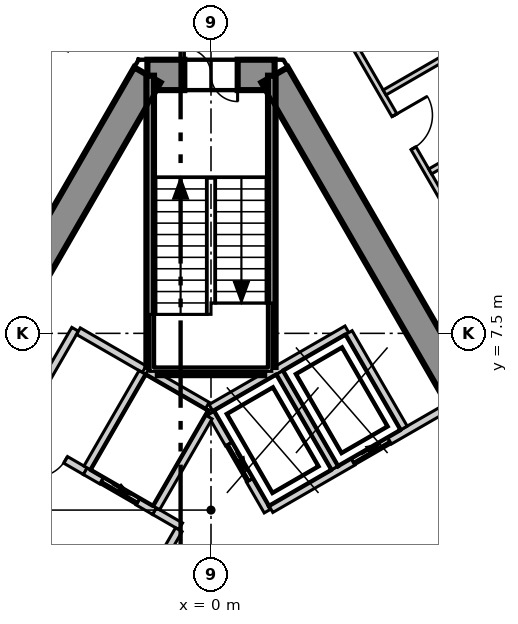
"""IFC4 building model, lengths in metres.
Left out: names, types, materials, properties, quantities, classifications, styles, units other than length and angle.
Written with IfcOpenShell. Run it as: python <this file> out.ifc"""

import sys

from ifc_helpers import new_model, si_unit, direction, frame, frame_2d, origin, place, context, subcontext, project, spatial, polyline, rectangle, outline, extrude, element, fill, save


model = new_model("IFC4")
c1 = context("Model", 3, precision=1e-05, world=origin(), true_north=direction((0.0, 1.0)))
c2 = subcontext(c1, "Body", "Model", "MODEL_VIEW")
j1 = project(units=[si_unit("LENGTHUNIT", "METRE"), si_unit("PLANEANGLEUNIT", "RADIAN")], contexts=[c1])
p1 = place(None, origin())
s1 = spatial("IfcSite", under=j1, at=p1, CompositionType="ELEMENT")
p2 = place(p1, origin())
s2 = spatial("IfcBuilding", under=s1, at=p2, CompositionType="ELEMENT")
p3 = place(p2, frame((0.0, 0.0, 116.3)))
s3 = spatial("IfcBuildingStorey", under=s2, at=p3, CompositionType="ELEMENT", Elevation=116.3)
p4 = place(p3, frame((1.674, 14.3, -0.3), z_axis=(0.0, 0.0, 1.0), x_axis=(-1.0, 0.0, 0.0)))
e1 = element("IfcWall", 1, at=p4, inside=s3, PredefinedType="SHEAR", context=c2, shape_type="SweptSolid", body=[
    extrude(outline(polyline([(-0.231, -0.4), (1.674, -0.4), (3.579, -0.4), (3.117, 0.4), (1.674, 0.4), (0.231, 0.4), (-0.231, -0.4)])), origin(), (0.0, 0.0, 1.0), 4.0),
])
p5 = place(p4, frame((0.974, 0.0, 0.3)))
e2 = element("IfcOpeningElement", 2, at=p5, cuts=e1, PredefinedType="OPENING", context=c2, shape_type="SweptSolid", body=[
    extrude(rectangle(XDim=1.4, YDim=2.1, at=frame_2d((0.7, 1.05))), frame((0.0, 0.41, 0.0), z_axis=(0.0, -1.0, 0.0), x_axis=(1.0, 0.0, 0.0)), (0.0, 0.0, 1.0), 0.82),
])
p6 = place(p3, frame((-1.674, 14.3, -0.3), z_axis=(0.0, 0.0, 1.0), x_axis=(-0.499995765644, -0.866027848477, 0.0)))
e3 = element("IfcWall", 3, at=p6, inside=s3, PredefinedType="SHEAR", context=c2, shape_type="SweptSolid", body=[
    extrude(outline(polyline([(-0.231, -0.4), (1.732, -0.4), (3.695, -0.4), (5.658, -0.4), (7.621, -0.4), (9.584, -0.4), (11.547, -0.4), (13.51, -0.4), (15.473, -0.4), (17.436, -0.4), (19.399, -0.4), (21.362, -0.4), (23.325, -0.4), (22.863, 0.4), (20.977, 0.4), (19.091, 0.4), (17.205, 0.4), (15.319, 0.4), (13.433, 0.4), (11.547, 0.4), (9.661, 0.4), (7.775, 0.4), (5.889, 0.4), (4.003, 0.4), (2.117, 0.4), (0.231, 0.4), (-0.231, -0.4)])), origin(), (0.0, 0.0, 1.0), 4.0),
])
p7 = place(p6, frame((10.997, 0.0, 0.3)))
e4 = element("IfcOpeningElement", 4, at=p7, cuts=e3, PredefinedType="OPENING", context=c2, shape_type="SweptSolid", body=[
    extrude(rectangle(XDim=1.1, YDim=2.1, at=frame_2d((0.55, 1.05))), frame((0.0, 0.41, 0.0), z_axis=(0.0, -1.0, 0.0), x_axis=(1.0, 0.0, 0.0)), (0.0, 0.0, 1.0), 0.82),
])
p8 = place(p3, frame((13.221, -5.7, -0.3), z_axis=(0.0, 0.0, 1.0), x_axis=(-0.499995765644, 0.866027848477, 0.0)))
e5 = element("IfcWall", 5, at=p8, inside=s3, PredefinedType="SHEAR", context=c2, shape_type="SweptSolid", body=[
    extrude(outline(polyline([(-0.231, -0.4), (1.732, -0.4), (3.695, -0.4), (5.658, -0.4), (7.621, -0.4), (9.584, -0.4), (11.547, -0.4), (13.51, -0.4), (15.473, -0.4), (17.436, -0.4), (19.399, -0.4), (21.362, -0.4), (23.325, -0.4), (22.863, 0.4), (20.977, 0.4), (19.091, 0.4), (17.205, 0.4), (15.319, 0.4), (13.433, 0.4), (11.547, 0.4), (9.661, 0.4), (7.775, 0.4), (5.889, 0.4), (4.003, 0.4), (2.117, 0.4), (0.231, 0.4), (-0.231, -0.4)])), origin(), (0.0, 0.0, 1.0), 4.0),
])
p9 = place(p8, frame((10.647, 0.0, 0.3)))
e6 = element("IfcOpeningElement", 6, at=p9, cuts=e5, PredefinedType="OPENING", context=c2, shape_type="SweptSolid", body=[
    extrude(rectangle(XDim=1.8, YDim=2.1, at=frame_2d((0.9, 1.05))), frame((0.0, 0.41, 0.0), z_axis=(0.0, -1.0, 0.0), x_axis=(1.0, 0.0, 0.0)), (0.0, 0.0, 1.0), 0.82),
])
p10 = place(p3, frame((-3.154, 35.185, 0.0), z_axis=(0.0, 0.0, 1.0), x_axis=(-0.499996704161, -0.866027306629, 0.0)))
e7 = element("IfcWall", 7, at=p10, inside=s3, PredefinedType="ELEMENTEDWALL", context=c2, shape_type="SweptSolid", body=[
    extrude(rectangle(XDim=57.769, YDim=0.2, at=frame_2d((28.884, 0.0))), origin(), (0.0, 0.0, 1.0), 3.7),
])
p11 = place(p10, frame((2.301, 0.0, 0.9)))
e8 = element("IfcOpeningElement", 8, at=p11, cuts=e7, PredefinedType="OPENING", context=c2, shape_type="SweptSolid", body=[
    extrude(rectangle(XDim=4.9, YDim=2.5, at=frame_2d((2.45, 1.25))), frame((0.0, 0.11, 0.0), z_axis=(0.0, -1.0, 0.0), x_axis=(1.0, 0.0, 0.0)), (0.0, 0.0, 1.0), 0.22),
])
p12 = place(p10, frame((9.199, 0.0, 0.9)))
e9 = element("IfcOpeningElement", 9, at=p12, cuts=e7, PredefinedType="OPENING", context=c2, shape_type="SweptSolid", body=[
    extrude(rectangle(XDim=4.9, YDim=2.5, at=frame_2d((2.45, 1.25))), frame((0.0, 0.11, 0.0), z_axis=(0.0, -1.0, 0.0), x_axis=(1.0, 0.0, 0.0)), (0.0, 0.0, 1.0), 0.22),
])
p13 = place(p10, frame((16.097, 0.0, 0.9)))
e10 = element("IfcOpeningElement", 10, at=p13, cuts=e7, PredefinedType="OPENING", context=c2, shape_type="SweptSolid", body=[
    extrude(rectangle(XDim=4.9, YDim=2.5, at=frame_2d((2.45, 1.25))), frame((0.0, 0.11, 0.0), z_axis=(0.0, -1.0, 0.0), x_axis=(1.0, 0.0, 0.0)), (0.0, 0.0, 1.0), 0.22),
])
p14 = place(p10, frame((22.995, 0.0, 0.9)))
e11 = element("IfcOpeningElement", 11, at=p14, cuts=e7, PredefinedType="OPENING", context=c2, shape_type="SweptSolid", body=[
    extrude(rectangle(XDim=4.9, YDim=2.5, at=frame_2d((2.45, 1.25))), frame((0.0, 0.11, 0.0), z_axis=(0.0, -1.0, 0.0), x_axis=(1.0, 0.0, 0.0)), (0.0, 0.0, 1.0), 0.22),
])
p15 = place(p10, frame((29.893, 0.0, 0.9)))
e12 = element("IfcOpeningElement", 12, at=p15, cuts=e7, PredefinedType="OPENING", context=c2, shape_type="SweptSolid", body=[
    extrude(rectangle(XDim=4.9, YDim=2.5, at=frame_2d((2.45, 1.25))), frame((0.0, 0.11, 0.0), z_axis=(0.0, -1.0, 0.0), x_axis=(1.0, 0.0, 0.0)), (0.0, 0.0, 1.0), 0.22),
])
p16 = place(p10, frame((36.791, 0.0, 0.9)))
e13 = element("IfcOpeningElement", 13, at=p16, cuts=e7, PredefinedType="OPENING", context=c2, shape_type="SweptSolid", body=[
    extrude(rectangle(XDim=4.9, YDim=2.5, at=frame_2d((2.45, 1.25))), frame((0.0, 0.11, 0.0), z_axis=(0.0, -1.0, 0.0), x_axis=(1.0, 0.0, 0.0)), (0.0, 0.0, 1.0), 0.22),
])
p17 = place(p10, frame((43.689, 0.0, 0.9)))
e14 = element("IfcOpeningElement", 14, at=p17, cuts=e7, PredefinedType="OPENING", context=c2, shape_type="SweptSolid", body=[
    extrude(rectangle(XDim=4.9, YDim=2.5, at=frame_2d((2.45, 1.25))), frame((0.0, 0.11, 0.0), z_axis=(0.0, -1.0, 0.0), x_axis=(1.0, 0.0, 0.0)), (0.0, 0.0, 1.0), 0.22),
])
p18 = place(p10, frame((50.586, 0.0, 0.9)))
e15 = element("IfcOpeningElement", 15, at=p18, cuts=e7, PredefinedType="OPENING", context=c2, shape_type="SweptSolid", body=[
    extrude(rectangle(XDim=4.9, YDim=2.5, at=frame_2d((2.45, 1.25))), frame((0.0, 0.11, 0.0), z_axis=(0.0, -1.0, 0.0), x_axis=(1.0, 0.0, 0.0)), (0.0, 0.0, 1.0), 0.22),
])
p19 = place(p3, frame((32.048, -14.861, 0.0), z_axis=(0.0, 0.0, 1.0), x_axis=(-0.499996704161, 0.866027306629, 0.0)))
e16 = element("IfcWall", 16, at=p19, inside=s3, PredefinedType="ELEMENTEDWALL", context=c2, shape_type="SweptSolid", body=[
    extrude(rectangle(XDim=57.769, YDim=0.2, at=frame_2d((28.884, 0.0))), origin(), (0.0, 0.0, 1.0), 3.7),
])
p20 = place(p19, frame((2.302, 0.0, 0.9)))
e17 = element("IfcOpeningElement", 17, at=p20, cuts=e16, PredefinedType="OPENING", context=c2, shape_type="SweptSolid", body=[
    extrude(rectangle(XDim=4.9, YDim=2.5, at=frame_2d((2.45, 1.25))), frame((0.0, 0.11, 0.0), z_axis=(0.0, -1.0, 0.0), x_axis=(1.0, 0.0, 0.0)), (0.0, 0.0, 1.0), 0.22),
])
p21 = place(p19, frame((9.199, 0.0, 0.9)))
e18 = element("IfcOpeningElement", 18, at=p21, cuts=e16, PredefinedType="OPENING", context=c2, shape_type="SweptSolid", body=[
    extrude(rectangle(XDim=4.9, YDim=2.5, at=frame_2d((2.45, 1.25))), frame((0.0, 0.11, 0.0), z_axis=(0.0, -1.0, 0.0), x_axis=(1.0, 0.0, 0.0)), (0.0, 0.0, 1.0), 0.22),
])
p22 = place(p19, frame((16.097, 0.0, 0.9)))
e19 = element("IfcOpeningElement", 19, at=p22, cuts=e16, PredefinedType="OPENING", context=c2, shape_type="SweptSolid", body=[
    extrude(rectangle(XDim=4.9, YDim=2.5, at=frame_2d((2.45, 1.25))), frame((0.0, 0.11, 0.0), z_axis=(0.0, -1.0, 0.0), x_axis=(1.0, 0.0, 0.0)), (0.0, 0.0, 1.0), 0.22),
])
p23 = place(p19, frame((22.995, 0.0, 0.9)))
e20 = element("IfcOpeningElement", 20, at=p23, cuts=e16, PredefinedType="OPENING", context=c2, shape_type="SweptSolid", body=[
    extrude(rectangle(XDim=4.9, YDim=2.5, at=frame_2d((2.45, 1.25))), frame((0.0, 0.11, 0.0), z_axis=(0.0, -1.0, 0.0), x_axis=(1.0, 0.0, 0.0)), (0.0, 0.0, 1.0), 0.22),
])
p24 = place(p19, frame((29.893, 0.0, 0.9)))
e21 = element("IfcOpeningElement", 21, at=p24, cuts=e16, PredefinedType="OPENING", context=c2, shape_type="SweptSolid", body=[
    extrude(rectangle(XDim=4.9, YDim=2.5, at=frame_2d((2.45, 1.25))), frame((0.0, 0.11, 0.0), z_axis=(0.0, -1.0, 0.0), x_axis=(1.0, 0.0, 0.0)), (0.0, 0.0, 1.0), 0.22),
])
p25 = place(p19, frame((36.791, 0.0, 0.9)))
e22 = element("IfcOpeningElement", 22, at=p25, cuts=e16, PredefinedType="OPENING", context=c2, shape_type="SweptSolid", body=[
    extrude(rectangle(XDim=4.9, YDim=2.5, at=frame_2d((2.45, 1.25))), frame((0.0, 0.11, 0.0), z_axis=(0.0, -1.0, 0.0), x_axis=(1.0, 0.0, 0.0)), (0.0, 0.0, 1.0), 0.22),
])
p26 = place(p19, frame((43.689, 0.0, 0.9)))
e23 = element("IfcOpeningElement", 23, at=p26, cuts=e16, PredefinedType="OPENING", context=c2, shape_type="SweptSolid", body=[
    extrude(rectangle(XDim=4.9, YDim=2.5, at=frame_2d((2.45, 1.25))), frame((0.0, 0.11, 0.0), z_axis=(0.0, -1.0, 0.0), x_axis=(1.0, 0.0, 0.0)), (0.0, 0.0, 1.0), 0.22),
])
p27 = place(p19, frame((50.587, 0.0, 0.9)))
e24 = element("IfcOpeningElement", 24, at=p27, cuts=e16, PredefinedType="OPENING", context=c2, shape_type="SweptSolid", body=[
    extrude(rectangle(XDim=4.9, YDim=2.5, at=frame_2d((2.45, 1.25))), frame((0.0, 0.11, 0.0), z_axis=(0.0, -1.0, 0.0), x_axis=(1.0, 0.0, 0.0)), (0.0, 0.0, 1.0), 0.22),
])
p28 = place(p3, frame((-5.454, 12.154, 0.0), z_axis=(0.0, 0.0, 1.0), x_axis=(0.500029221456, 0.866008532111, 0.0)))
e25 = element("IfcWall", 25, at=p28, inside=s3, PredefinedType="PARTITIONING", context=c2, shape_type="SweptSolid", body=[
    extrude(rectangle(XDim=10.907, YDim=0.15, at=frame_2d((5.454, 0.0))), origin(), (0.0, 0.0, 1.0), 3.7),
])
p29 = place(p28, frame((7.857, 0.0, 0.0)))
e26 = element("IfcOpeningElement", 26, at=p29, cuts=e25, PredefinedType="OPENING", context=c2, shape_type="SweptSolid", body=[
    extrude(rectangle(XDim=1.1, YDim=2.1, at=frame_2d((0.55, 1.05))), frame((0.0, 0.085, 0.0), z_axis=(0.0, -1.0, 0.0), x_axis=(1.0, 0.0, 0.0)), (0.0, 0.0, 1.0), 0.17),
])
p30 = place(p28, frame((2.248, 0.0, 0.0)))
e27 = element("IfcOpeningElement", 27, at=p30, cuts=e25, PredefinedType="OPENING", context=c2, shape_type="SweptSolid", body=[
    extrude(rectangle(XDim=1.0, YDim=2.1, at=frame_2d((0.5, 1.05))), frame((0.0, 0.085, 0.0), z_axis=(0.0, -1.0, 0.0), x_axis=(1.0, 0.0, 0.0)), (0.0, 0.0, 1.0), 0.17),
])
p31 = place(p28, frame((4.348, 0.0, 0.0)))
e28 = element("IfcOpeningElement", 28, at=p31, cuts=e25, PredefinedType="OPENING", context=c2, shape_type="SweptSolid", body=[
    extrude(rectangle(XDim=0.9, YDim=2.1, at=frame_2d((0.45, 1.05))), frame((0.0, 0.085, 0.0), z_axis=(0.0, -1.0, 0.0), x_axis=(1.0, 0.0, 0.0)), (0.0, 0.0, 1.0), 0.17),
])
p32 = place(p3, frame((0.076, 21.468, 0.0), z_axis=(0.0, 0.0, 1.0), x_axis=(0.500006592492, -0.866021597574, 0.0)))
e29 = element("IfcWall", 29, at=p32, inside=s3, PredefinedType="PARTITIONING", context=c2, shape_type="SweptSolid", body=[
    extrude(rectangle(XDim=17.652, YDim=0.15, at=frame_2d((8.826, 0.0))), origin(), (0.0, 0.0, 1.0), 3.7),
])
p33 = place(p32, frame((6.303, 0.0, 0.0)))
e30 = element("IfcOpeningElement", 30, at=p33, cuts=e29, PredefinedType="OPENING", context=c2, shape_type="SweptSolid", body=[
    extrude(rectangle(XDim=1.1, YDim=2.1, at=frame_2d((0.55, 1.05))), frame((0.0, 0.085, 0.0), z_axis=(0.0, -1.0, 0.0), x_axis=(1.0, 0.0, 0.0)), (0.0, 0.0, 1.0), 0.17),
])
p34 = place(p32, frame((12.403, 0.0, 0.0)))
e31 = element("IfcOpeningElement", 31, at=p34, cuts=e29, PredefinedType="OPENING", context=c2, shape_type="SweptSolid", body=[
    extrude(rectangle(XDim=0.9, YDim=2.1, at=frame_2d((0.45, 1.05))), frame((0.0, 0.085, 0.0), z_axis=(0.0, -1.0, 0.0), x_axis=(1.0, 0.0, 0.0)), (0.0, 0.0, 1.0), 0.17),
])
p35 = place(p32, frame((9.503, 0.0, 0.0)))
e32 = element("IfcOpeningElement", 32, at=p35, cuts=e29, PredefinedType="OPENING", context=c2, shape_type="SweptSolid", body=[
    extrude(rectangle(XDim=1.0, YDim=2.1, at=frame_2d((0.5, 1.05))), frame((0.0, 0.085, 0.0), z_axis=(0.0, -1.0, 0.0), x_axis=(1.0, 0.0, 0.0)), (0.0, 0.0, 1.0), 0.17),
])
p36 = place(p32, frame((1.708, 0.0, 0.0)))
e33 = element("IfcOpeningElement", 33, at=p36, cuts=e29, PredefinedType="OPENING", context=c2, shape_type="SweptSolid", body=[
    extrude(rectangle(XDim=1.1, YDim=2.1, at=frame_2d((0.55, 1.05))), frame((0.0, 0.085, 0.0), z_axis=(0.0, -1.0, 0.0), x_axis=(1.0, 0.0, 0.0)), (0.0, 0.0, 1.0), 0.17),
])
p37 = place(p3, frame((4.568, 13.838, 0.0), z_axis=(0.0, 0.0, 1.0), x_axis=(0.866013532718, 0.500020560727, 0.0)))
e34 = element("IfcWall", 34, at=p37, inside=s3, PredefinedType="PARTITIONING", context=c2, shape_type="SweptSolid", body=[
    extrude(rectangle(XDim=3.45, YDim=0.15, at=frame_2d((1.725, 0.0))), origin(), (0.0, 0.0, 1.0), 3.7),
])
p38 = place(p3, frame((5.768, 11.76, 0.0), z_axis=(0.0, 0.0, 1.0), x_axis=(0.866031223622, 0.49998991961, 0.0)))
e35 = element("IfcWall", 35, at=p38, inside=s3, PredefinedType="PARTITIONING", context=c2, shape_type="SweptSolid", body=[
    extrude(rectangle(XDim=3.45, YDim=0.15, at=frame_2d((1.725, 0.0))), origin(), (0.0, 0.0, 1.0), 3.7),
])
p39 = place(p3, frame((-0.002, 5.541, 0.0), z_axis=(0.0, 0.0, 1.0), x_axis=(0.86600155993, 0.500041296494, 0.0)))
e36 = element("IfcWall", 36, at=p39, inside=s3, PredefinedType="SOLIDWALL", context=c2, shape_type="SweptSolid", body=[
    extrude(rectangle(XDim=4.132, YDim=0.2, at=frame_2d((2.066, 0.0))), origin(), (0.0, 0.0, 1.0), 3.7),
])
p40 = place(p3, frame((0.0, 5.4, 0.0), z_axis=(0.0, 0.0, 1.0), x_axis=(0.500103862429, -0.865965430478, 0.0)))
e37 = element("IfcWall", 37, at=p40, inside=s3, PredefinedType="SOLIDWALL", context=c2, shape_type="SweptSolid", body=[
    extrude(rectangle(XDim=2.973, YDim=0.2, at=frame_2d((1.487, 0.0))), origin(), (0.0, 0.0, 1.0), 3.7),
])
p41 = place(p40, frame((0.937, 0.0, 0.0)))
e38 = element("IfcOpeningElement", 38, at=p41, cuts=e37, PredefinedType="OPENING", context=c2, shape_type="SweptSolid", body=[
    extrude(rectangle(XDim=1.1, YDim=2.1, at=frame_2d((0.55, 1.05))), frame((0.0, 0.11, 0.0), z_axis=(0.0, -1.0, 0.0), x_axis=(1.0, 0.0, 0.0)), (0.0, 0.0, 1.0), 0.22),
])
p42 = place(p3, frame((1.577, 2.874, 0.0), z_axis=(0.0, 0.0, 1.0), x_axis=(0.866073694534, 0.499916348638, 0.0)))
e39 = element("IfcWall", 39, at=p42, inside=s3, PredefinedType="SOLIDWALL", context=c2, shape_type="SweptSolid", body=[
    extrude(rectangle(XDim=5.777, YDim=0.2, at=frame_2d((2.888, 0.0))), origin(), (0.0, 0.0, 1.0), 3.7),
])
p43 = place(p42, frame((2.497, 0.0, 0.0)))
e40 = element("IfcOpeningElement", 40, at=p43, cuts=e39, PredefinedType="OPENING", context=c2, shape_type="SweptSolid", body=[
    extrude(rectangle(XDim=1.1, YDim=2.1, at=frame_2d((0.55, 1.05))), frame((0.0, 0.11, 0.0), z_axis=(0.0, -1.0, 0.0), x_axis=(1.0, 0.0, 0.0)), (0.0, 0.0, 1.0), 0.22),
])
p44 = place(p3, frame((3.278, -0.071, 0.0), z_axis=(0.0, 0.0, 1.0), x_axis=(0.865929348003, 0.5001663366, 0.0)))
e41 = element("IfcWall", 41, at=p44, inside=s3, PredefinedType="SOLIDWALL", context=c2, shape_type="SweptSolid", body=[
    extrude(rectangle(XDim=5.776, YDim=0.2, at=frame_2d((2.888, 0.0))), origin(), (0.0, 0.0, 1.0), 3.7),
])
for number, where, z_axis, x_axis in (
    (42, (3.626, 7.52, 0.0), (0.0, 0.0, 1.0), (0.5, -0.866, 0.0)),
    (43, (1.807, 6.47, 0.0), (0.0, 0.0, 1.0), (0.5, -0.866, 0.0)),
):
    element("IfcWall", number, at=place(p3, frame(where, z_axis=z_axis, x_axis=x_axis)), inside=s3, PredefinedType="SOLIDWALL", context=c2, shape_type="SweptSolid", body=[
        extrude(rectangle(XDim=2.9, YDim=0.2, at=frame_2d((1.45, 0.0))), origin(), (0.0, 0.0, 1.0), 3.7),
    ])
p45 = place(p3, frame((-6.58, 5.762, 0.0), z_axis=(0.0, 0.0, 1.0), x_axis=(0.866029704776, -0.49999255039, 0.0)))
e44 = element("IfcWall", 44, at=p45, inside=s3, PredefinedType="SOLIDWALL", context=c2, shape_type="SweptSolid", body=[
    extrude(rectangle(XDim=3.782, YDim=0.2, at=frame_2d((1.891, 0.0))), origin(), (0.0, 0.0, 1.0), 3.7),
])
p46 = place(p45, frame((2.279, 0.0, 0.0)))
e45 = element("IfcOpeningElement", 45, at=p46, cuts=e44, PredefinedType="OPENING", context=c2, shape_type="SweptSolid", body=[
    extrude(rectangle(XDim=0.9, YDim=2.1, at=frame_2d((0.45, 1.05))), frame((0.0, 0.11, 0.0), z_axis=(0.0, -1.0, 0.0), x_axis=(1.0, 0.0, 0.0)), (0.0, 0.0, 1.0), 0.22),
])
p47 = place(p3, frame((-1.488, 2.822, 0.0), z_axis=(0.0, 0.0, 1.0), x_axis=(0.866236612152, -0.499633997809, 0.0)))
e46 = element("IfcWall", 46, at=p47, inside=s3, PredefinedType="SOLIDWALL", context=c2, shape_type="SweptSolid", body=[
    extrude(rectangle(XDim=0.796, YDim=0.2, at=frame_2d((0.398, 0.0))), origin(), (0.0, 0.0, 1.0), 3.7),
])
p48 = place(p3, frame((-5.076, 5.009, 0.0), z_axis=(0.0, 0.0, 1.0), x_axis=(0.50002537861, 0.866010750942, 0.0)))
e47 = element("IfcWall", 47, at=p48, inside=s3, PredefinedType="SOLIDWALL", context=c2, shape_type="SweptSolid", body=[
    extrude(rectangle(XDim=3.0, YDim=0.2, at=frame_2d((1.5, 0.0))), origin(), (0.0, 0.0, 1.0), 3.7),
])
p49 = place(p3, frame((-3.489, 7.557, 0.0), z_axis=(0.0, 0.0, 1.0), x_axis=(0.866010750942, -0.50002537861, 0.0)))
e48 = element("IfcWall", 48, at=p49, inside=s3, PredefinedType="SOLIDWALL", context=c2, shape_type="SweptSolid", body=[
    extrude(rectangle(XDim=2.0, YDim=0.2, at=frame_2d((1.0, 0.0))), origin(), (0.0, 0.0, 1.0), 3.7),
])
p50 = place(p3, frame((-2.444, -0.433, 0.0), z_axis=(0.0, 0.0, 1.0), x_axis=(0.500035624827, 0.866004834804, 0.0)))
e49 = element("IfcWall", 49, at=p50, inside=s3, PredefinedType="SOLIDWALL", context=c2, shape_type="SweptSolid", body=[
    extrude(rectangle(XDim=3.194, YDim=0.2, at=frame_2d((1.597, 0.0))), origin(), (0.0, 0.0, 1.0), 3.7),
])
p51 = place(p3, frame((-3.309, 3.873, 0.0), z_axis=(0.0, 0.0, 1.0), x_axis=(0.866098583652, -0.499873227325, 0.0)))
e50 = element("IfcWall", 50, at=p51, inside=s3, PredefinedType="SOLIDWALL", context=c2, shape_type="SweptSolid", body=[
    extrude(rectangle(XDim=2.103, YDim=0.2, at=frame_2d((1.051, 0.0))), origin(), (0.0, 0.0, 1.0), 3.7),
])
p52 = place(p51, frame((0.502, 0.0, 0.0)))
e51 = element("IfcOpeningElement", 51, at=p52, cuts=e50, PredefinedType="OPENING", context=c2, shape_type="SweptSolid", body=[
    extrude(rectangle(XDim=1.1, YDim=2.1, at=frame_2d((0.55, 1.05))), frame((0.0, 0.11, 0.0), z_axis=(0.0, -1.0, 0.0), x_axis=(1.0, 0.0, 0.0)), (0.0, 0.0, 1.0), 0.22),
])
p53 = place(p3, frame((-3.257, 3.959, 0.0), z_axis=(0.0, 0.0, 1.0), x_axis=(0.50012328804, 0.865954211699, 0.0)))
e52 = element("IfcWall", 52, at=p53, inside=s3, PredefinedType="SOLIDWALL", context=c2, shape_type="SweptSolid", body=[
    extrude(rectangle(XDim=2.9, YDim=0.2, at=frame_2d((1.45, 0.0))), origin(), (0.0, 0.0, 1.0), 3.7),
])
p54 = place(p3, frame((-1.67, 6.507, 0.0), z_axis=(0.0, 0.0, 1.0), x_axis=(0.865941441609, -0.500145398563, 0.0)))
e53 = element("IfcWall", 53, at=p54, inside=s3, PredefinedType="SOLIDWALL", context=c2, shape_type="SweptSolid", body=[
    extrude(rectangle(XDim=1.815, YDim=0.2, at=frame_2d((0.908, 0.0))), origin(), (0.0, 0.0, 1.0), 3.7),
])
p55 = place(p3, frame((-1.438, 2.909, 0.0), z_axis=(0.0, 0.0, 1.0), x_axis=(0.499829630636, 0.866123744241, 0.0)))
e54 = element("IfcWall", 54, at=p55, inside=s3, PredefinedType="SOLIDWALL", context=c2, shape_type="SweptSolid", body=[
    extrude(rectangle(XDim=2.761, YDim=0.2, at=frame_2d((1.38, 0.0))), origin(), (0.0, 0.0, 1.0), 3.7),
])
p56 = place(p3, frame((1.6, 6.615, 0.0), z_axis=(0.0, 0.0, 1.0), x_axis=(0.0, 1.0, 0.0)))
e55 = element("IfcWall", 55, at=p56, inside=s3, PredefinedType="SOLIDWALL", context=c2, shape_type="SweptSolid", body=[
    extrude(rectangle(XDim=7.665, YDim=0.2, at=frame_2d((3.833, 0.0))), origin(), (0.0, 0.0, 1.0), 3.7),
])
p57 = place(p3, frame((-1.4, 6.5, 0.0), z_axis=(0.0, 0.0, 1.0), x_axis=(1.0, 0.0, 0.0)))
e56 = element("IfcWall", 56, at=p57, inside=s3, PredefinedType="SOLIDWALL", context=c2, shape_type="SweptSolid", body=[
    extrude(rectangle(XDim=2.8, YDim=0.2, at=frame_2d((1.4, 0.0))), origin(), (0.0, 0.0, 1.0), 3.7),
])
p58 = place(p3, frame((-1.6, 6.615, 0.0), z_axis=(0.0, 0.0, 1.0), x_axis=(0.0, 1.0, 0.0)))
e57 = element("IfcWall", 57, at=p58, inside=s3, PredefinedType="SOLIDWALL", context=c2, shape_type="SweptSolid", body=[
    extrude(rectangle(XDim=7.665, YDim=0.2, at=frame_2d((3.833, 0.0))), origin(), (0.0, 0.0, 1.0), 3.7),
])
p59 = place(p41, origin())
e58 = element("IfcDoor", 58, at=p59, inside=s3, OperationType="SLIDING_TO_LEFT", PredefinedType="DOOR", context=c2, shape_type="SweptSolid", body=[
    extrude(rectangle(XDim=1.1, YDim=2.1, at=frame_2d((0.55, 1.05))), frame((0.0, 0.025, 0.0), z_axis=(0.0, -1.0, 0.0), x_axis=(1.0, 0.0, 0.0)), (0.0, 0.0, 1.0), 0.05),
])
fill(e38, e58)
p60 = place(p43, origin())
e59 = element("IfcDoor", 59, at=p60, inside=s3, OperationType="SLIDING_TO_LEFT", PredefinedType="DOOR", context=c2, shape_type="SweptSolid", body=[
    extrude(rectangle(XDim=1.1, YDim=2.1, at=frame_2d((0.55, 1.05))), frame((0.0, 0.025, 0.0), z_axis=(0.0, -1.0, 0.0), x_axis=(1.0, 0.0, 0.0)), (0.0, 0.0, 1.0), 0.05),
])
fill(e40, e59)
p61 = place(p52, origin())
e60 = element("IfcDoor", 60, at=p61, inside=s3, OperationType="SLIDING_TO_LEFT", PredefinedType="DOOR", context=c2, shape_type="SweptSolid", body=[
    extrude(rectangle(XDim=1.1, YDim=2.1, at=frame_2d((0.55, 1.05))), frame((0.0, 0.025, 0.0), z_axis=(0.0, -1.0, 0.0), x_axis=(1.0, 0.0, 0.0)), (0.0, 0.0, 1.0), 0.05),
])
fill(e51, e60)
p62 = place(p46, origin())
e61 = element("IfcDoor", 61, at=p62, inside=s3, OperationType="SINGLE_SWING_LEFT", PredefinedType="DOOR", context=c2, shape_type="SweptSolid", body=[
    extrude(rectangle(XDim=0.9, YDim=2.1, at=frame_2d((0.45, 1.05))), frame((0.0, 0.025, 0.0), z_axis=(0.0, -1.0, 0.0), x_axis=(1.0, 0.0, 0.0)), (0.0, 0.0, 1.0), 0.05),
])
fill(e45, e61)
p63 = place(p35, origin())
e62 = element("IfcDoor", 62, at=p63, inside=s3, OperationType="SINGLE_SWING_RIGHT", PredefinedType="DOOR", context=c2, shape_type="SweptSolid", body=[
    extrude(rectangle(XDim=1.0, YDim=2.1, at=frame_2d((0.5, 1.05))), frame((0.0, 0.025, 0.0), z_axis=(0.0, -1.0, 0.0), x_axis=(1.0, 0.0, 0.0)), (0.0, 0.0, 1.0), 0.05),
])
fill(e32, e62)
p64 = place(p30, origin())
e63 = element("IfcDoor", 63, at=p64, inside=s3, OperationType="SINGLE_SWING_LEFT", PredefinedType="DOOR", context=c2, shape_type="SweptSolid", body=[
    extrude(rectangle(XDim=1.0, YDim=2.1, at=frame_2d((0.5, 1.05))), frame((0.0, 0.025, 0.0), z_axis=(0.0, -1.0, 0.0), x_axis=(1.0, 0.0, 0.0)), (0.0, 0.0, 1.0), 0.05),
])
fill(e27, e63)
p65 = place(p5, origin())
e64 = element("IfcDoor", 64, at=p65, inside=s3, OperationType="DOUBLE_DOOR_SINGLE_SWING", PredefinedType="DOOR", context=c2, shape_type="SweptSolid", body=[
    extrude(rectangle(XDim=1.4, YDim=2.1, at=frame_2d((0.7, 1.05))), frame((0.0, 0.025, 0.0), z_axis=(0.0, -1.0, 0.0), x_axis=(1.0, 0.0, 0.0)), (0.0, 0.0, 1.0), 0.05),
])
fill(e2, e64)
save(model, sys.argv[1])
